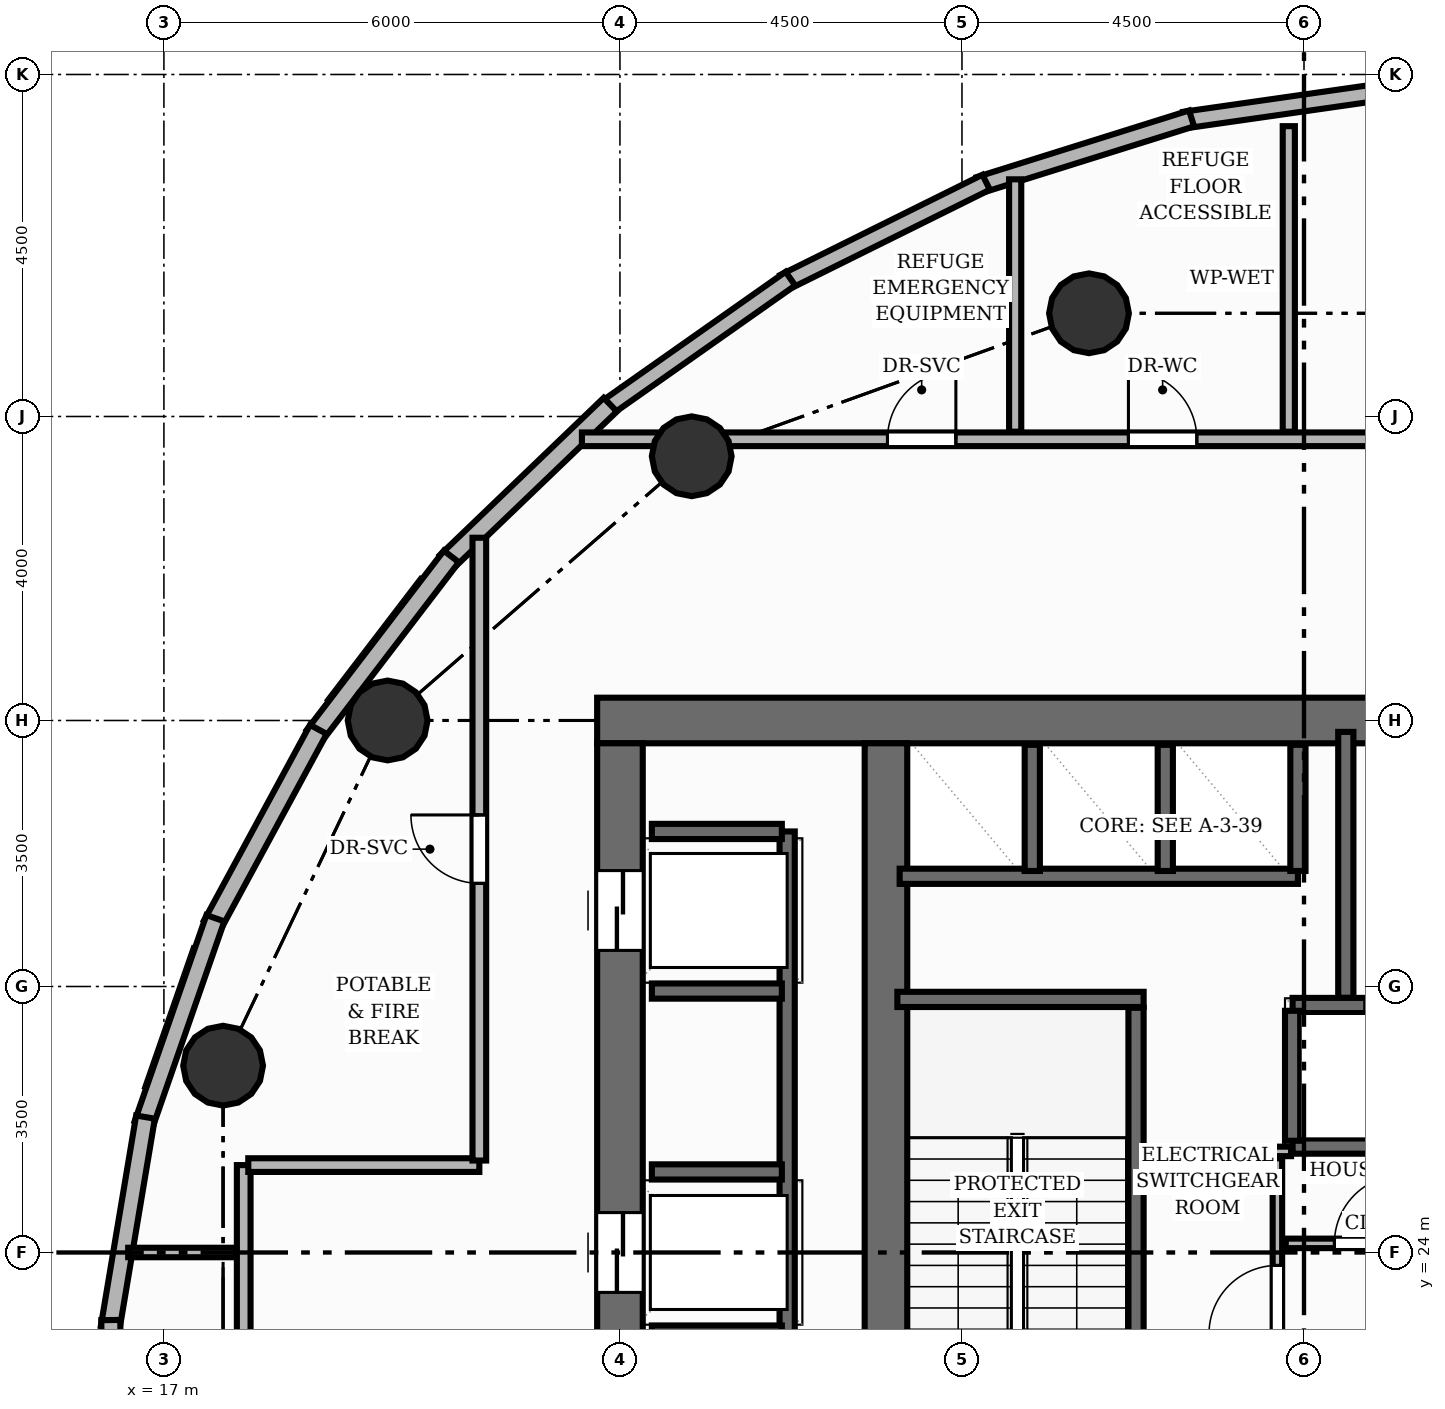
"""IFC4 building model, lengths in metres.
Left out: names, types, materials, properties, quantities, classifications, styles, units other than length and angle.
Written with IfcOpenShell. Run it as: python <this file> out.ifc"""

import sys

from ifc_helpers import new_model, si_unit, direction, frame, frame_2d, origin, origin_2d, place, context, subcontext, project, spatial, rectangle, circle, extrude, element, fill, save


model = new_model("IFC4")
c1 = context("Model", 3, precision=1e-05, world=origin(), true_north=direction((0.0, 1.0)))
c2 = subcontext(c1, "Body", "Model", "MODEL_VIEW")
j1 = project(units=[si_unit("LENGTHUNIT", "METRE"), si_unit("PLANEANGLEUNIT", "RADIAN")], contexts=[c1])
p1 = place(None, origin())
s1 = spatial("IfcSite", under=j1, at=p1, CompositionType="ELEMENT")
p2 = place(p1, origin())
s2 = spatial("IfcBuilding", under=s1, at=p2, CompositionType="ELEMENT")
p3 = place(p2, frame((0.0, 0.0, 158.56)))
s3 = spatial("IfcBuildingStorey", under=s2, at=p3, CompositionType="ELEMENT", Elevation=158.56)
p4 = place(p3, frame((22.7, 31.0, 0.0), z_axis=(0.0, 0.0, 1.0), x_axis=(1.0, 0.0, 0.0)))
e1 = element("IfcWall", 1, at=p4, inside=s3, PredefinedType="SHEAR", context=c2, shape_type="SweptSolid", body=[
    extrude(rectangle(XDim=15.1, YDim=0.6, at=frame_2d((7.55, 0.0))), origin(), (0.0, 0.0, 1.0), 4.48),
])
p5 = place(p4, frame((10.2, 0.0, 0.0)))
e2 = element("IfcOpeningElement", 2, at=p5, cuts=e1, PredefinedType="OPENING", context=c2, shape_type="SweptSolid", body=[
    extrude(rectangle(XDim=1.1, YDim=2.15, at=frame_2d((0.55, 1.075))), frame((0.0, 0.31, 0.0), z_axis=(0.0, -1.0, 0.0), x_axis=(1.0, 0.0, 0.0)), (0.0, 0.0, 1.0), 0.62),
])
p6 = place(p4, frame((12.05, 0.0, 0.0)))
e3 = element("IfcOpeningElement", 3, at=p6, cuts=e1, PredefinedType="OPENING", context=c2, shape_type="SweptSolid", body=[
    extrude(rectangle(XDim=1.1, YDim=2.15, at=frame_2d((0.55, 1.075))), frame((0.0, 0.31, 0.0), z_axis=(0.0, -1.0, 0.0), x_axis=(1.0, 0.0, 0.0)), (0.0, 0.0, 1.0), 0.62),
])
p7 = place(p3, frame((23.0, 17.3, 0.0), z_axis=(0.0, 0.0, 1.0), x_axis=(0.0, 1.0, 0.0)))
e4 = element("IfcWall", 4, at=p7, inside=s3, PredefinedType="SHEAR", context=c2, shape_type="SweptSolid", body=[
    extrude(rectangle(XDim=13.4, YDim=0.6, at=frame_2d((6.7, 0.0))), origin(), (0.0, 0.0, 1.0), 4.48),
])
p8 = place(p7, frame((1.675, 0.0, 0.0)))
e5 = element("IfcOpeningElement", 5, at=p8, cuts=e4, PredefinedType="OPENING", context=c2, shape_type="SweptSolid", body=[
    extrude(rectangle(XDim=1.05, YDim=2.15, at=frame_2d((0.525, 1.075))), frame((0.0, 0.31, 0.0), z_axis=(0.0, -1.0, 0.0), x_axis=(1.0, 0.0, 0.0)), (0.0, 0.0, 1.0), 0.62),
])
p9 = place(p7, frame((6.175, 0.0, 0.0)))
e6 = element("IfcOpeningElement", 6, at=p9, cuts=e4, PredefinedType="OPENING", context=c2, shape_type="SweptSolid", body=[
    extrude(rectangle(XDim=1.05, YDim=2.15, at=frame_2d((0.525, 1.075))), frame((0.0, 0.31, 0.0), z_axis=(0.0, -1.0, 0.0), x_axis=(1.0, 0.0, 0.0)), (0.0, 0.0, 1.0), 0.62),
])
p10 = place(p7, frame((10.675, 0.0, 0.0)))
e7 = element("IfcOpeningElement", 7, at=p10, cuts=e4, PredefinedType="OPENING", context=c2, shape_type="SweptSolid", body=[
    extrude(rectangle(XDim=1.05, YDim=2.15, at=frame_2d((0.525, 1.075))), frame((0.0, 0.31, 0.0), z_axis=(0.0, -1.0, 0.0), x_axis=(1.0, 0.0, 0.0)), (0.0, 0.0, 1.0), 0.62),
])
p11 = place(p3, frame((26.5, 17.3, 0.0), z_axis=(0.0, 0.0, 1.0), x_axis=(0.0, 1.0, 0.0)))
e8 = element("IfcWall", 8, at=p11, inside=s3, PredefinedType="SHEAR", context=c2, shape_type="SweptSolid", body=[
    extrude(rectangle(XDim=13.4, YDim=0.56, at=frame_2d((6.7, 0.0))), origin(), (0.0, 0.0, 1.0), 4.48),
])
for number, where, z_axis, x_axis in (
    (9, (29.171, 36.358, 0.0), (0.0, 0.0, 1.0), (1.0, 0.0, 0.0)),
    (10, (23.944, 34.477, 0.0), (0.0, 0.0, 1.0), (1.0, 0.0, 0.0)),
    (11, (19.944, 31.0, 0.0), (0.0, 0.0, 1.0), (1.0, 0.0, 0.0)),
    (12, (17.779, 26.458, 0.0), (0.0, 0.0, 1.0), (1.0, 0.0, 0.0)),
):
    element("IfcColumn", number, at=place(p3, frame(where, z_axis=z_axis, x_axis=x_axis)), inside=s3, PredefinedType="COLUMN", context=c2, shape_type="SweptSolid", body=[
        extrude(circle(Radius=0.525, at=origin_2d()), origin(), (0.0, 0.0, 1.0), 4.48),
    ])
p12 = place(p3, frame((30.426, 38.9, 0.0), z_axis=(0.0, 0.0, 1.0), x_axis=(0.989906941775, 0.141718900029, 0.0)))
e13 = element("IfcWall", 13, at=p12, inside=s3, PredefinedType="PARAPET", context=c2, shape_type="SweptSolid", body=[
    extrude(rectangle(XDim=2.872, YDim=0.22, at=frame_2d((1.436, 0.0))), origin(), (0.0, 0.0, 1.0), 1.15),
])
p13 = place(p3, frame((27.728, 38.046, 0.0), z_axis=(0.0, 0.0, 1.0), x_axis=(0.95419458776, 0.299186712089, 0.0)))
e14 = element("IfcWall", 14, at=p13, inside=s3, PredefinedType="PARAPET", context=c2, shape_type="SweptSolid", body=[
    extrude(rectangle(XDim=2.927, YDim=0.22, at=frame_2d((1.463, 0.0))), origin(), (0.0, 0.0, 1.0), 1.15),
])
p14 = place(p3, frame((25.16, 36.764, 0.0), z_axis=(0.0, 0.0, 1.0), x_axis=(0.895985112276, 0.444084089536, 0.0)))
e15 = element("IfcWall", 15, at=p14, inside=s3, PredefinedType="PARAPET", context=c2, shape_type="SweptSolid", body=[
    extrude(rectangle(XDim=2.967, YDim=0.22, at=frame_2d((1.483, 0.0))), origin(), (0.0, 0.0, 1.0), 1.15),
])
p15 = place(p3, frame((22.799, 35.094, 0.0), z_axis=(0.0, 0.0, 1.0), x_axis=(0.817874769697, 0.575396264407, 0.0)))
e16 = element("IfcWall", 16, at=p15, inside=s3, PredefinedType="PARAPET", context=c2, shape_type="SweptSolid", body=[
    extrude(rectangle(XDim=2.988, YDim=0.22, at=frame_2d((1.494, 0.0))), origin(), (0.0, 0.0, 1.0), 1.15),
])
p16 = place(p3, frame((20.717, 33.086, 0.0), z_axis=(0.0, 0.0, 1.0), x_axis=(0.721419973425, 0.692497813675, 0.0)))
e17 = element("IfcWall", 17, at=p16, inside=s3, PredefinedType="SOLIDWALL", context=c2, shape_type="SweptSolid", body=[
    extrude(rectangle(XDim=2.988, YDim=0.25, at=frame_2d((1.494, 0.0))), origin(), (0.0, 0.0, 1.0), 4.24),
])
p17 = place(p3, frame((18.979, 30.801, 0.0), z_axis=(0.0, 0.0, 1.0), x_axis=(0.607477593954, 0.794336813224, 0.0)))
e18 = element("IfcWall", 18, at=p17, inside=s3, PredefinedType="SOLIDWALL", context=c2, shape_type="SweptSolid", body=[
    extrude(rectangle(XDim=2.967, YDim=0.25, at=frame_2d((1.484, 0.0))), origin(), (0.0, 0.0, 1.0), 4.24),
])
p18 = place(p3, frame((17.638, 28.309, 0.0), z_axis=(0.0, 0.0, 1.0), x_axis=(0.476366446531, 0.879246841689, 0.0)))
e19 = element("IfcWall", 19, at=p18, inside=s3, PredefinedType="SOLIDWALL", context=c2, shape_type="SweptSolid", body=[
    extrude(rectangle(XDim=2.927, YDim=0.25, at=frame_2d((1.463, 0.0))), origin(), (0.0, 0.0, 1.0), 4.24),
])
p19 = place(p3, frame((16.733, 25.686, 0.0), z_axis=(0.0, 0.0, 1.0), x_axis=(0.328698694134, 0.944434840777, 0.0)))
e20 = element("IfcWall", 20, at=p19, inside=s3, PredefinedType="SOLIDWALL", context=c2, shape_type="SweptSolid", body=[
    extrude(rectangle(XDim=2.872, YDim=0.25, at=frame_2d((1.436, 0.0))), origin(), (0.0, 0.0, 1.0), 4.24),
])
p20 = place(p3, frame((16.293, 23.012, 0.0), z_axis=(0.0, 0.0, 1.0), x_axis=(0.165301369928, 0.986243102435, 0.0)))
e21 = element("IfcWall", 21, at=p20, inside=s3, PredefinedType="SOLIDWALL", context=c2, shape_type="SweptSolid", body=[
    extrude(rectangle(XDim=2.808, YDim=0.25, at=frame_2d((1.404, 0.0))), origin(), (0.0, 0.0, 1.0), 4.24),
])
p21 = place(p3, frame((16.332, 20.369, 0.0), z_axis=(0.0, 0.0, 1.0), x_axis=(-0.011130209899, 0.999938057295, 0.0)))
e22 = element("IfcWall", 22, at=p21, inside=s3, PredefinedType="SOLIDWALL", context=c2, shape_type="SweptSolid", body=[
    extrude(rectangle(XDim=2.742, YDim=0.25, at=frame_2d((1.371, 0.0))), origin(), (0.0, 0.0, 1.0), 4.24),
])
p22 = place(p3, frame((29.79, 20.78, 0.0), z_axis=(0.0, 0.0, 1.0), x_axis=(0.0, 1.0, 0.0)))
e23 = element("IfcWall", 23, at=p22, inside=s3, PredefinedType="SHEAR", context=c2, shape_type="SweptSolid", body=[
    extrude(rectangle(XDim=6.44, YDim=0.2, at=frame_2d((3.22, 0.0))), origin(), (0.0, 0.0, 1.0), 4.48),
])
p23 = place(p3, frame((26.65, 27.33, 0.0), z_axis=(0.0, 0.0, 1.0), x_axis=(1.0, 0.0, 0.0)))
e24 = element("IfcWall", 24, at=p23, inside=s3, PredefinedType="SHEAR", context=c2, shape_type="SweptSolid", body=[
    extrude(rectangle(XDim=3.24, YDim=0.2, at=frame_2d((1.62, 0.0))), origin(), (0.0, 0.0, 1.0), 4.48),
])
p24 = place(p3, frame((32.55, 27.35, 0.0), z_axis=(0.0, 0.0, 1.0), x_axis=(0.0, 1.0, 0.0)))
e25 = element("IfcWall", 25, at=p24, inside=s3, PredefinedType="SHEAR", context=c2, shape_type="SweptSolid", body=[
    extrude(rectangle(XDim=3.5, YDim=0.2, at=frame_2d((1.75, 0.0))), origin(), (0.0, 0.0, 1.0), 4.48),
])
p25 = place(p3, frame((31.85, 27.25, 0.0), z_axis=(0.0, 0.0, 1.0), x_axis=(1.0, 0.0, 0.0)))
e26 = element("IfcWall", 26, at=p25, inside=s3, PredefinedType="SHEAR", context=c2, shape_type="SweptSolid", body=[
    extrude(rectangle(XDim=2.3, YDim=0.2, at=frame_2d((1.15, 0.0))), origin(), (0.0, 0.0, 1.0), 4.48),
])
p26 = place(p25, frame((0.95, 0.0, 0.0)))
e27 = element("IfcOpeningElement", 27, at=p26, cuts=e26, PredefinedType="OPENING", context=c2, shape_type="SweptSolid", body=[
    extrude(rectangle(XDim=1.1, YDim=2.15, at=frame_2d((0.55, 1.075))), frame((0.0, 0.11, 0.0), z_axis=(0.0, -1.0, 0.0), x_axis=(1.0, 0.0, 0.0)), (0.0, 0.0, 1.0), 0.22),
])
p27 = place(p3, frame((31.85, 25.4, 0.0), z_axis=(0.0, 0.0, 1.0), x_axis=(1.0, 0.0, 0.0)))
e28 = element("IfcWall", 28, at=p27, inside=s3, PredefinedType="SHEAR", context=c2, shape_type="SweptSolid", body=[
    extrude(rectangle(XDim=2.3, YDim=0.2, at=frame_2d((1.15, 0.0))), origin(), (0.0, 0.0, 1.0), 4.48),
])
p28 = place(p3, frame((31.85, 25.47, 0.0), z_axis=(0.0, 0.0, 1.0), x_axis=(0.0, 1.0, 0.0)))
e29 = element("IfcWall", 29, at=p28, inside=s3, PredefinedType="SHEAR", context=c2, shape_type="SweptSolid", body=[
    extrude(rectangle(XDim=1.71, YDim=0.2, at=frame_2d((0.855, 0.0))), origin(), (0.0, 0.0, 1.0), 4.48),
])
p29 = place(p3, frame((25.2, 18.46, 0.0), z_axis=(0.0, 0.0, 1.0), x_axis=(0.0, 1.0, 0.0)))
e30 = element("IfcWall", 30, at=p29, inside=s3, PredefinedType="SHEAR", context=c2, shape_type="SweptSolid", body=[
    extrude(rectangle(XDim=11.08, YDim=0.2, at=frame_2d((5.54, 0.0))), origin(), (0.0, 0.0, 1.0), 4.48),
])
for number, where, z_axis, x_axis in (
    (31, (23.42, 29.54, 0.0), (0.0, 0.0, 1.0), (1.0, 0.0, 0.0)),
    (32, (23.42, 22.94, 0.0), (0.0, 0.0, 1.0), (1.0, 0.0, 0.0)),
    (33, (23.42, 25.06, 0.0), (0.0, 0.0, 1.0), (1.0, 0.0, 0.0)),
    (34, (23.42, 27.44, 0.0), (0.0, 0.0, 1.0), (1.0, 0.0, 0.0)),
):
    element("IfcWall", number, at=place(p3, frame(where, z_axis=z_axis, x_axis=x_axis)), inside=s3, PredefinedType="SHEAR", context=c2, shape_type="SweptSolid", body=[
        extrude(rectangle(XDim=1.71, YDim=0.2, at=frame_2d((0.855, 0.0))), origin(), (0.0, 0.0, 1.0), 4.48),
    ])
p30 = place(p3, frame((26.68, 28.95, 0.0), z_axis=(0.0, 0.0, 1.0), x_axis=(1.0, 0.0, 0.0)))
e35 = element("IfcWall", 35, at=p30, inside=s3, PredefinedType="SHEAR", context=c2, shape_type="SweptSolid", body=[
    extrude(rectangle(XDim=5.24, YDim=0.2, at=frame_2d((2.62, 0.0))), origin(), (0.0, 0.0, 1.0), 4.48),
])
for number, where, z_axis, x_axis in (
    (36, (31.92, 29.02, 0.0), (0.0, 0.0, 1.0), (0.0, 1.0, 0.0)),
    (37, (28.425, 29.02, 0.0), (0.0, 0.0, 1.0), (0.0, 1.0, 0.0)),
    (38, (30.175, 29.02, 0.0), (0.0, 0.0, 1.0), (0.0, 1.0, 0.0)),
):
    element("IfcWall", number, at=place(p3, frame(where, z_axis=z_axis, x_axis=x_axis)), inside=s3, PredefinedType="SHEAR", context=c2, shape_type="SweptSolid", body=[
        extrude(rectangle(XDim=1.66, YDim=0.2, at=frame_2d((0.83, 0.0))), origin(), (0.0, 0.0, 1.0), 4.48),
    ])
p31 = place(p3, frame((31.65, 22.72, 0.0), z_axis=(0.0, 0.0, 1.0), x_axis=(0.0, 1.0, 0.0)))
e39 = element("IfcWall", 39, at=p31, inside=s3, PredefinedType="PARTITIONING", context=c2, shape_type="SweptSolid", body=[
    extrude(rectangle(XDim=2.52, YDim=0.125, at=frame_2d((1.26, 0.0))), origin(), (0.0, 0.0, 1.0), 4.235),
])
p32 = place(p31, frame((0.21, 0.0, 0.0)))
e40 = element("IfcOpeningElement", 40, at=p32, cuts=e39, PredefinedType="OPENING", context=c2, shape_type="SweptSolid", body=[
    extrude(rectangle(XDim=0.9, YDim=2.1, at=frame_2d((0.45, 1.05))), frame((0.0, 0.073, 0.0), z_axis=(0.0, -1.0, 0.0), x_axis=(1.0, 0.0, 0.0)), (0.0, 0.0, 1.0), 0.145),
])
p33 = place(p3, frame((31.76, 24.12, 0.0), z_axis=(0.0, 0.0, 1.0), x_axis=(1.0, 0.0, 0.0)))
e41 = element("IfcWall", 41, at=p33, inside=s3, PredefinedType="PARTITIONING", context=c2, shape_type="SweptSolid", body=[
    extrude(rectangle(XDim=2.32, YDim=0.125, at=frame_2d((1.16, 0.0))), origin(), (0.0, 0.0, 1.0), 4.235),
])
p34 = place(p33, frame((0.64, 0.0, 0.0)))
e42 = element("IfcOpeningElement", 42, at=p34, cuts=e41, PredefinedType="OPENING", context=c2, shape_type="SweptSolid", body=[
    extrude(rectangle(XDim=0.9, YDim=2.1, at=frame_2d((0.45, 1.05))), frame((0.0, 0.073, 0.0), z_axis=(0.0, -1.0, 0.0), x_axis=(1.0, 0.0, 0.0)), (0.0, 0.0, 1.0), 0.145),
])
p35 = place(p3, frame((29.89, 25.33, 0.0), z_axis=(0.0, 0.0, 1.0), x_axis=(1.0, 0.0, 0.0)))
e43 = element("IfcWall", 43, at=p35, inside=s3, PredefinedType="PARTITIONING", context=c2, shape_type="SweptSolid", body=[
    extrude(rectangle(XDim=1.94, YDim=0.125, at=frame_2d((0.97, 0.0))), origin(), (0.0, 0.0, 1.0), 4.235),
])
p36 = place(p3, frame((22.5, 34.7, 0.0), z_axis=(0.0, 0.0, 1.0), x_axis=(1.0, 0.0, 0.0)))
e44 = element("IfcWall", 44, at=p36, inside=s3, PredefinedType="PARTITIONING", context=c2, shape_type="SweptSolid", body=[
    extrude(rectangle(XDim=16.851, YDim=0.18, at=frame_2d((8.425, 0.0))), origin(), (0.0, 0.0, 1.0), 3.768),
])
p37 = place(p36, frame((12.755, 0.0, 0.0)))
e45 = element("IfcOpeningElement", 45, at=p37, cuts=e44, PredefinedType="OPENING", context=c2, shape_type="SweptSolid", body=[
    extrude(rectangle(XDim=0.9, YDim=2.1, at=frame_2d((0.45, 1.05))), frame((0.0, 0.1, 0.0), z_axis=(0.0, -1.0, 0.0), x_axis=(1.0, 0.0, 0.0)), (0.0, 0.0, 1.0), 0.2),
])
p38 = place(p36, frame((7.19, 0.0, 0.0)))
e46 = element("IfcOpeningElement", 46, at=p38, cuts=e44, PredefinedType="OPENING", context=c2, shape_type="SweptSolid", body=[
    extrude(rectangle(XDim=0.9, YDim=2.1, at=frame_2d((0.45, 1.05))), frame((0.0, 0.1, 0.0), z_axis=(0.0, -1.0, 0.0), x_axis=(1.0, 0.0, 0.0)), (0.0, 0.0, 1.0), 0.2),
])
p39 = place(p36, frame((4.02, 0.0, 0.0)))
e47 = element("IfcOpeningElement", 47, at=p39, cuts=e44, PredefinedType="OPENING", context=c2, shape_type="SweptSolid", body=[
    extrude(rectangle(XDim=0.9, YDim=2.1, at=frame_2d((0.45, 1.05))), frame((0.0, 0.1, 0.0), z_axis=(0.0, -1.0, 0.0), x_axis=(1.0, 0.0, 0.0)), (0.0, 0.0, 1.0), 0.2),
])
p40 = place(p3, frame((18.05, 22.91, 0.0), z_axis=(0.0, 0.0, 1.0), x_axis=(0.0, 1.0, 0.0)))
e48 = element("IfcWall", 48, at=p40, inside=s3, PredefinedType="PARTITIONING", context=c2, shape_type="SweptSolid", body=[
    extrude(rectangle(XDim=2.24, YDim=0.18, at=frame_2d((1.12, 0.0))), origin(), (0.0, 0.0, 1.0), 4.235),
])
p41 = place(p3, frame((18.11, 25.15, 0.0), z_axis=(0.0, 0.0, 1.0), x_axis=(1.0, 0.0, 0.0)))
e49 = element("IfcWall", 49, at=p41, inside=s3, PredefinedType="PARTITIONING", context=c2, shape_type="SweptSolid", body=[
    extrude(rectangle(XDim=3.04, YDim=0.18, at=frame_2d((1.52, 0.0))), origin(), (0.0, 0.0, 1.0), 4.235),
])
p42 = place(p3, frame((21.15, 25.21, 0.0), z_axis=(0.0, 0.0, 1.0), x_axis=(0.0, 1.0, 0.0)))
e50 = element("IfcWall", 50, at=p42, inside=s3, PredefinedType="PARTITIONING", context=c2, shape_type="SweptSolid", body=[
    extrude(rectangle(XDim=8.195, YDim=0.18, at=frame_2d((4.097, 0.0))), origin(), (0.0, 0.0, 1.0), 4.235),
])
p43 = place(p42, frame((3.647, 0.0, 0.0)))
e51 = element("IfcOpeningElement", 51, at=p43, cuts=e50, PredefinedType="OPENING", context=c2, shape_type="SweptSolid", body=[
    extrude(rectangle(XDim=0.9, YDim=2.1, at=frame_2d((0.45, 1.05))), frame((0.0, 0.1, 0.0), z_axis=(0.0, -1.0, 0.0), x_axis=(1.0, 0.0, 0.0)), (0.0, 0.0, 1.0), 0.2),
])
p44 = place(p3, frame((31.8, 34.8, 0.0), z_axis=(0.0, 0.0, 1.0), x_axis=(0.0, 1.0, 0.0)))
e52 = element("IfcWall", 52, at=p44, inside=s3, PredefinedType="PLUMBINGWALL", context=c2, shape_type="SweptSolid", body=[
    extrude(rectangle(XDim=4.02, YDim=0.16, at=frame_2d((2.01, 0.0))), origin(), (0.0, 0.0, 1.0), 4.235),
])
p45 = place(p3, frame((28.2, 34.8, 0.0), z_axis=(0.0, 0.0, 1.0), x_axis=(0.0, 1.0, 0.0)))
e53 = element("IfcWall", 53, at=p45, inside=s3, PredefinedType="PLUMBINGWALL", context=c2, shape_type="SweptSolid", body=[
    extrude(rectangle(XDim=3.321, YDim=0.16, at=frame_2d((1.66, 0.0))), origin(), (0.0, 0.0, 1.0), 4.235),
])
p46 = place(p3, frame((16.53, 24.0, 0.0), z_axis=(0.0, 0.0, 1.0), x_axis=(1.0, 0.0, 0.0)))
e54 = element("IfcWall", 54, at=p46, inside=s3, PredefinedType="PARTITIONING", context=c2, shape_type="SweptSolid", body=[
    extrude(rectangle(XDim=1.42, YDim=0.125, at=frame_2d((0.71, 0.0))), origin(), (0.0, 0.0, 1.0), 4.235),
])
p47 = place(p9, origin())
e55 = element("IfcDoor", 55, at=p47, inside=s3, OperationType="DOUBLE_DOOR_SLIDING", PredefinedType="DOOR", context=c2, shape_type="SweptSolid", body=[
    extrude(rectangle(XDim=1.05, YDim=2.15, at=frame_2d((0.525, 1.075))), frame((0.0, 0.025, 0.0), z_axis=(0.0, -1.0, 0.0), x_axis=(1.0, 0.0, 0.0)), (0.0, 0.0, 1.0), 0.05),
])
fill(e6, e55)
p48 = place(p10, origin())
e56 = element("IfcDoor", 56, at=p48, inside=s3, OperationType="DOUBLE_DOOR_SLIDING", PredefinedType="DOOR", context=c2, shape_type="SweptSolid", body=[
    extrude(rectangle(XDim=1.05, YDim=2.15, at=frame_2d((0.525, 1.075))), frame((0.0, 0.025, 0.0), z_axis=(0.0, -1.0, 0.0), x_axis=(1.0, 0.0, 0.0)), (0.0, 0.0, 1.0), 0.05),
])
fill(e7, e56)
p49 = place(p32, origin())
e57 = element("IfcDoor", 57, at=p49, inside=s3, OperationType="SINGLE_SWING_LEFT", PredefinedType="DOOR", context=c2, shape_type="SweptSolid", body=[
    extrude(rectangle(XDim=0.9, YDim=2.1, at=frame_2d((0.45, 1.05))), frame((0.0, 0.025, 0.0), z_axis=(0.0, -1.0, 0.0), x_axis=(1.0, 0.0, 0.0)), (0.0, 0.0, 1.0), 0.05),
])
fill(e40, e57)
p50 = place(p34, origin())
e58 = element("IfcDoor", 58, at=p50, inside=s3, OperationType="SINGLE_SWING_RIGHT", PredefinedType="DOOR", context=c2, shape_type="SweptSolid", body=[
    extrude(rectangle(XDim=0.9, YDim=2.1, at=frame_2d((0.45, 1.05))), frame((0.0, 0.025, 0.0), z_axis=(0.0, -1.0, 0.0), x_axis=(1.0, 0.0, 0.0)), (0.0, 0.0, 1.0), 0.05),
])
fill(e42, e58)
p51 = place(p38, origin())
e59 = element("IfcDoor", 59, at=p51, inside=s3, OperationType="SINGLE_SWING_LEFT", PredefinedType="DOOR", context=c2, shape_type="SweptSolid", body=[
    extrude(rectangle(XDim=0.9, YDim=2.1, at=frame_2d((0.45, 1.05))), frame((0.0, 0.025, 0.0), z_axis=(0.0, -1.0, 0.0), x_axis=(1.0, 0.0, 0.0)), (0.0, 0.0, 1.0), 0.05),
])
fill(e46, e59)
p52 = place(p39, origin())
e60 = element("IfcDoor", 60, at=p52, inside=s3, OperationType="SINGLE_SWING_RIGHT", PredefinedType="DOOR", context=c2, shape_type="SweptSolid", body=[
    extrude(rectangle(XDim=0.9, YDim=2.1, at=frame_2d((0.45, 1.05))), frame((0.0, 0.025, 0.0), z_axis=(0.0, -1.0, 0.0), x_axis=(1.0, 0.0, 0.0)), (0.0, 0.0, 1.0), 0.05),
])
fill(e47, e60)
p53 = place(p43, origin())
e61 = element("IfcDoor", 61, at=p53, inside=s3, OperationType="SINGLE_SWING_RIGHT", PredefinedType="DOOR", context=c2, shape_type="SweptSolid", body=[
    extrude(rectangle(XDim=0.9, YDim=2.1, at=frame_2d((0.45, 1.05))), frame((0.0, 0.025, 0.0), z_axis=(0.0, -1.0, 0.0), x_axis=(1.0, 0.0, 0.0)), (0.0, 0.0, 1.0), 0.05),
])
fill(e51, e61)
save(model, sys.argv[1])
